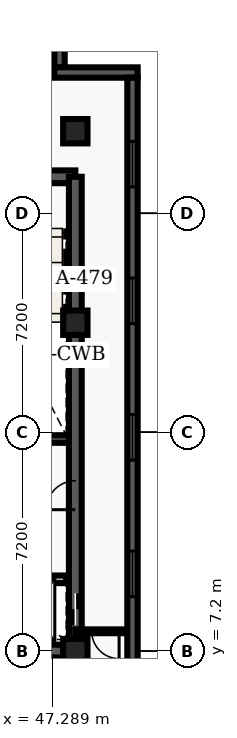
"""IFC4 building model, lengths in metres.
Left out: names, types, materials, properties, quantities, classifications, styles, units other than length and angle.
Written with IfcOpenShell. Run it as: python <this file> out.ifc"""

import sys

from ifc_helpers import new_model, entity, si_unit, converted_unit, direction, frame, origin_with_axes, origin_2d_with_axis, place, context, subcontext, project, spatial, polyline, rectangle, outline, extrude, element, fill, save


model = new_model("IFC4")
c1 = context("Model", 3, precision=1e-05, world=origin_with_axes(), true_north=direction((0.0, 1.0)))
c2 = subcontext(c1, "Body", "Model", "MODEL_VIEW")
j1 = project(units=[si_unit("LENGTHUNIT", "METRE"), converted_unit("PLANEANGLEUNIT", "DEGREE", entity("IfcPlaneAngleMeasure", 0.017), si_unit("PLANEANGLEUNIT", "RADIAN"), dimensions=[0, 0, 0, 0, 0, 0, 0])], contexts=[c1])
p1 = place(None, origin_with_axes())
s1 = spatial("IfcSite", under=j1, at=p1, CompositionType="ELEMENT")
p2 = place(p1, origin_with_axes())
s2 = spatial("IfcBuilding", under=s1, at=p2, CompositionType="ELEMENT")
p3 = place(p2, frame((0.0, 0.0, 280.2), z_axis=(0.0, 0.0, 1.0), x_axis=(1.0, 0.0, 0.0)))
s3 = spatial("IfcBuildingStorey", under=s2, at=p3, CompositionType="ELEMENT", Elevation=280.2)
p4 = place(p3, frame((40.2, 7.2, 0.0), z_axis=(0.0, 0.0, 1.0), x_axis=(1.0, 0.0, 0.0)))
e1 = element("IfcWall", 1, at=p4, inside=s3, PredefinedType="SHEAR", context=c2, shape_type="SweptSolid", body=[
    extrude(outline(polyline([(0.0, -0.21), (7.85, -0.21), (7.85, 0.21), (0.0, 0.21), (0.0, -0.21)])), origin_with_axes(), (0.0, 0.0, 1.0), 3.66),
])
p5 = place(p4, frame((2.175, 0.0, 0.0), z_axis=(0.0, 0.0, 1.0), x_axis=(1.0, 0.0, 0.0)))
e2 = element("IfcOpeningElement", 2, at=p5, cuts=e1, PredefinedType="OPENING", context=c2, shape_type="SweptSolid", body=[
    extrude(rectangle(XDim=1.05, YDim=0.44, at=origin_2d_with_axis()), origin_with_axes(), (0.0, 0.0, 1.0), 2.15),
])
p6 = place(p3, frame((40.2, 22.8, 0.0), z_axis=(0.0, 0.0, 1.0), x_axis=(1.0, 0.0, 0.0)))
e3 = element("IfcWall", 3, at=p6, inside=s3, PredefinedType="SHEAR", context=c2, shape_type="SweptSolid", body=[
    extrude(outline(polyline([(0.0, -0.21), (7.85, -0.21), (7.85, 0.21), (0.0, 0.21), (0.0, -0.21)])), origin_with_axes(), (0.0, 0.0, 1.0), 3.66),
])
p7 = place(p6, frame((5.775, 0.0, 0.0), z_axis=(0.0, 0.0, 1.0), x_axis=(1.0, 0.0, 0.0)))
e4 = element("IfcOpeningElement", 4, at=p7, cuts=e3, PredefinedType="OPENING", context=c2, shape_type="SweptSolid", body=[
    extrude(rectangle(XDim=1.05, YDim=0.44, at=origin_2d_with_axis()), origin_with_axes(), (0.0, 0.0, 1.0), 2.15),
])
p8 = place(p6, frame((2.15, 0.0, 0.0), z_axis=(0.0, 0.0, 1.0), x_axis=(1.0, 0.0, 0.0)))
e5 = element("IfcOpeningElement", 5, at=p8, cuts=e3, PredefinedType="OPENING", context=c2, shape_type="SweptSolid", body=[
    extrude(rectangle(XDim=0.9, YDim=0.44, at=origin_2d_with_axis()), origin_with_axes(), (0.0, 0.0, 1.0), 2.15),
])
p9 = place(p3, frame((48.05, 7.2, 0.0), z_axis=(0.0, 0.0, 1.0), x_axis=(0.0, 1.0, 0.0)))
e6 = element("IfcWall", 6, at=p9, inside=s3, PredefinedType="SHEAR", context=c2, shape_type="SweptSolid", body=[
    extrude(outline(polyline([(0.0, -0.21), (15.6, -0.21), (15.6, 0.21), (0.0, 0.21), (0.0, -0.21)])), origin_with_axes(), (0.0, 0.0, 1.0), 3.66),
])
p10 = place(p9, frame((1.375, 0.0, 0.0), z_axis=(0.0, 0.0, 1.0), x_axis=(1.0, 0.0, 0.0)))
e7 = element("IfcOpeningElement", 7, at=p10, cuts=e6, PredefinedType="OPENING", context=c2, shape_type="SweptSolid", body=[
    extrude(rectangle(XDim=1.05, YDim=0.44, at=origin_2d_with_axis()), origin_with_axes(), (0.0, 0.0, 1.0), 2.15),
])
p11 = place(p9, frame((5.125, 0.0, 0.0), z_axis=(0.0, 0.0, 1.0), x_axis=(1.0, 0.0, 0.0)))
e8 = element("IfcOpeningElement", 8, at=p11, cuts=e6, PredefinedType="OPENING", context=c2, shape_type="SweptSolid", body=[
    extrude(rectangle(XDim=0.95, YDim=0.44, at=origin_2d_with_axis()), origin_with_axes(), (0.0, 0.0, 1.0), 2.15),
])
p12 = place(p3, frame((44.25, 14.175, 0.0), z_axis=(0.0, 0.0, 1.0), x_axis=(1.0, 0.0, 0.0)))
e9 = element("IfcWall", 9, at=p12, inside=s3, PredefinedType="SHEAR", context=c2, shape_type="SweptSolid", body=[
    extrude(outline(polyline([(0.0, -0.125), (3.59, -0.125), (3.59, 0.125), (0.0, 0.125), (0.0, -0.125)])), origin_with_axes(), (0.0, 0.0, 1.0), 3.66),
])
for number, where, z_axis, x_axis in (
    (10, (48.05, 7.2, 0.0), (0.0, 0.0, 1.0), (1.0, 0.0, 0.0)),
    (11, (48.05, 18.0, 0.0), (0.0, 0.0, 1.0), (1.0, 0.0, 0.0)),
    (12, (48.05, 24.3, 0.0), (0.0, 0.0, 1.0), (1.0, 0.0, 0.0)),
):
    element("IfcColumn", number, at=place(p3, frame(where, z_axis=z_axis, x_axis=x_axis)), inside=s3, PredefinedType="COLUMN", context=c2, shape_type="SweptSolid", body=[
        extrude(rectangle(XDim=0.8, YDim=0.8, at=origin_2d_with_axis()), origin_with_axes(), (0.0, 0.0, 1.0), 3.9),
    ])
p13 = place(p3, frame((44.25, 9.56, 0.0), z_axis=(0.0, 0.0, 1.0), x_axis=(1.0, 0.0, 0.0)))
e13 = element("IfcWall", 13, at=p13, inside=s3, PredefinedType="SOLIDWALL", context=c2, shape_type="SweptSolid", body=[
    extrude(outline(polyline([(0.0, -0.125), (3.5, -0.125), (3.5, 0.125), (0.0, 0.125), (0.0, -0.125)])), origin_with_axes(), (0.0, 0.0, 1.0), 2.7),
])
p14 = place(p3, frame((49.765, 7.85, 0.0), z_axis=(0.0, 0.0, 1.0), x_axis=(-1.0, 0.0, 0.0)))
e14 = element("IfcWall", 14, at=p14, inside=s3, PredefinedType="PARTITIONING", context=c2, shape_type="SweptSolid", body=[
    extrude(outline(polyline([(0.0, -0.062), (1.715, -0.062), (1.715, 0.062), (0.0, 0.062), (0.0, -0.062)])), origin_with_axes(), (0.0, 0.0, 1.0), 2.7),
])
p15 = place(p14, frame((0.725, 0.0, 0.0), z_axis=(0.0, 0.0, 1.0), x_axis=(1.0, 0.0, 0.0)))
e15 = element("IfcOpeningElement", 15, at=p15, cuts=e14, PredefinedType="OPENING", context=c2, shape_type="SweptSolid", body=[
    extrude(rectangle(XDim=0.9, YDim=0.145, at=origin_2d_with_axis()), origin_with_axes(), (0.0, 0.0, 1.0), 2.15),
])
p16 = place(p3, frame((34.535, 26.65, 0.0), z_axis=(0.0, 0.0, 1.0), x_axis=(1.0, 0.0, 0.0)))
e16 = element("IfcWall", 16, at=p16, inside=s3, PredefinedType="PARTITIONING", context=c2, shape_type="SweptSolid", body=[
    extrude(outline(polyline([(0.0, -0.062), (12.995, -0.062), (12.995, 0.062), (0.0, 0.062), (0.0, -0.062)])), origin_with_axes(), (0.0, 0.0, 1.0), 2.7),
])
p17 = place(p16, frame((8.465, 0.0, 0.0), z_axis=(0.0, 0.0, 1.0), x_axis=(1.0, 0.0, 0.0)))
e17 = element("IfcOpeningElement", 17, at=p17, cuts=e16, PredefinedType="OPENING", context=c2, shape_type="SweptSolid", body=[
    extrude(rectangle(XDim=1.0, YDim=0.145, at=origin_2d_with_axis()), origin_with_axes(), (0.0, 0.0, 1.0), 2.15),
])
p18 = place(p3, frame((47.53, 28.46, 0.0), z_axis=(0.0, 0.0, 1.0), x_axis=(0.0, -1.0, 0.0)))
e18 = element("IfcWall", 18, at=p18, inside=s3, PredefinedType="SOLIDWALL", context=c2, shape_type="SweptSolid", body=[
    extrude(outline(polyline([(0.0, -0.17), (2.06, -0.17), (2.06, 0.17), (0.0, 0.17), (0.0, -0.17)])), origin_with_axes(), (0.0, 0.0, 1.0), 3.66),
])
p19 = place(p3, frame((47.36, 26.23, 0.0), z_axis=(0.0, 0.0, 1.0), x_axis=(1.0, 0.0, 0.0)))
e19 = element("IfcWall", 19, at=p19, inside=s3, PredefinedType="SOLIDWALL", context=c2, shape_type="SweptSolid", body=[
    extrude(outline(polyline([(0.0, -0.17), (2.74, -0.17), (2.74, 0.17), (0.0, 0.17), (0.0, -0.17)])), origin_with_axes(), (0.0, 0.0, 1.0), 3.66),
])
p20 = place(p3, frame((49.93, 26.06, 0.0), z_axis=(0.0, 0.0, 1.0), x_axis=(0.0, -1.0, 0.0)))
e20 = element("IfcWall", 20, at=p20, inside=s3, PredefinedType="SOLIDWALL", context=c2, shape_type="SweptSolid", body=[
    extrude(outline(polyline([(0.0, -0.17), (23.66, -0.17), (23.66, 0.17), (0.0, 0.17), (0.0, -0.17)])), origin_with_axes(), (0.0, 0.0, 1.0), 3.66),
])
p21 = place(p20, frame((2.846, 0.0, 0.45), z_axis=(0.0, 0.0, 1.0), x_axis=(1.0, 0.0, 0.0)))
e21 = element("IfcOpeningElement", 21, at=p21, cuts=e20, PredefinedType="OPENING", context=c2, shape_type="SweptSolid", body=[
    extrude(rectangle(XDim=1.5, YDim=0.36, at=origin_2d_with_axis()), origin_with_axes(), (0.0, 0.0, 1.0), 2.1),
])
p22 = place(p20, frame((7.338, 0.0, 0.45), z_axis=(0.0, 0.0, 1.0), x_axis=(1.0, 0.0, 0.0)))
e22 = element("IfcOpeningElement", 22, at=p22, cuts=e20, PredefinedType="OPENING", context=c2, shape_type="SweptSolid", body=[
    extrude(rectangle(XDim=1.5, YDim=0.36, at=origin_2d_with_axis()), origin_with_axes(), (0.0, 0.0, 1.0), 2.1),
])
p23 = place(p20, frame((11.83, 0.0, 0.45), z_axis=(0.0, 0.0, 1.0), x_axis=(1.0, 0.0, 0.0)))
e23 = element("IfcOpeningElement", 23, at=p23, cuts=e20, PredefinedType="OPENING", context=c2, shape_type="SweptSolid", body=[
    extrude(rectangle(XDim=1.5, YDim=0.36, at=origin_2d_with_axis()), origin_with_axes(), (0.0, 0.0, 1.0), 2.1),
])
p24 = place(p20, frame((16.322, 0.0, 0.45), z_axis=(0.0, 0.0, 1.0), x_axis=(1.0, 0.0, 0.0)))
e24 = element("IfcOpeningElement", 24, at=p24, cuts=e20, PredefinedType="OPENING", context=c2, shape_type="SweptSolid", body=[
    extrude(rectangle(XDim=1.5, YDim=0.36, at=origin_2d_with_axis()), origin_with_axes(), (0.0, 0.0, 1.0), 2.1),
])
p25 = place(p20, frame((20.814, 0.0, 0.45), z_axis=(0.0, 0.0, 1.0), x_axis=(1.0, 0.0, 0.0)))
e25 = element("IfcOpeningElement", 25, at=p25, cuts=e20, PredefinedType="OPENING", context=c2, shape_type="SweptSolid", body=[
    extrude(rectangle(XDim=1.5, YDim=0.36, at=origin_2d_with_axis()), origin_with_axes(), (0.0, 0.0, 1.0), 2.1),
])
p26 = place(p9, frame((1.375, 0.0, 0.0), z_axis=(0.0, 0.0, 1.0), x_axis=(1.0, 0.0, 0.0)))
e26 = element("IfcDoor", 26, at=p26, inside=s3, OperationType="SLIDING_TO_LEFT", PredefinedType="DOOR", context=c2, shape_type="SweptSolid", body=[
    extrude(rectangle(XDim=1.05, YDim=0.09, at=origin_2d_with_axis()), origin_with_axes(), (0.0, 0.0, 1.0), 2.15),
])
fill(e7, e26)
p27 = place(p9, frame((5.125, 0.0, 0.0), z_axis=(0.0, 0.0, 1.0), x_axis=(1.0, 0.0, 0.0)))
e27 = element("IfcDoor", 27, at=p27, inside=s3, OperationType="SINGLE_SWING_LEFT", PredefinedType="DOOR", context=c2, shape_type="SweptSolid", body=[
    extrude(rectangle(XDim=0.95, YDim=0.09, at=origin_2d_with_axis()), origin_with_axes(), (0.0, 0.0, 1.0), 2.15),
])
fill(e8, e27)
p28 = place(p14, frame((0.725, 0.0, 0.0), z_axis=(0.0, 0.0, 1.0), x_axis=(1.0, 0.0, 0.0)))
e28 = element("IfcDoor", 28, at=p28, inside=s3, OperationType="SINGLE_SWING_LEFT", PredefinedType="DOOR", context=c2, shape_type="SweptSolid", body=[
    extrude(rectangle(XDim=0.9, YDim=0.075, at=origin_2d_with_axis()), origin_with_axes(), (0.0, 0.0, 1.0), 2.15),
])
fill(e15, e28)
p29 = place(p20, frame((2.846, 0.0, 0.45), z_axis=(0.0, 0.0, 1.0), x_axis=(1.0, 0.0, 0.0)))
e29 = element("IfcWindow", 29, at=p29, inside=s3, PredefinedType="WINDOW", context=c2, shape_type="SweptSolid", body=[
    extrude(rectangle(XDim=1.5, YDim=0.09, at=origin_2d_with_axis()), origin_with_axes(), (0.0, 0.0, 1.0), 2.1),
])
fill(e21, e29)
p30 = place(p20, frame((7.338, 0.0, 0.45), z_axis=(0.0, 0.0, 1.0), x_axis=(1.0, 0.0, 0.0)))
e30 = element("IfcWindow", 30, at=p30, inside=s3, PredefinedType="WINDOW", context=c2, shape_type="SweptSolid", body=[
    extrude(rectangle(XDim=1.5, YDim=0.09, at=origin_2d_with_axis()), origin_with_axes(), (0.0, 0.0, 1.0), 2.1),
])
fill(e22, e30)
p31 = place(p20, frame((11.83, 0.0, 0.45), z_axis=(0.0, 0.0, 1.0), x_axis=(1.0, 0.0, 0.0)))
e31 = element("IfcWindow", 31, at=p31, inside=s3, PredefinedType="WINDOW", context=c2, shape_type="SweptSolid", body=[
    extrude(rectangle(XDim=1.5, YDim=0.09, at=origin_2d_with_axis()), origin_with_axes(), (0.0, 0.0, 1.0), 2.1),
])
fill(e23, e31)
p32 = place(p20, frame((16.322, 0.0, 0.45), z_axis=(0.0, 0.0, 1.0), x_axis=(1.0, 0.0, 0.0)))
e32 = element("IfcWindow", 32, at=p32, inside=s3, PredefinedType="WINDOW", context=c2, shape_type="SweptSolid", body=[
    extrude(rectangle(XDim=1.5, YDim=0.09, at=origin_2d_with_axis()), origin_with_axes(), (0.0, 0.0, 1.0), 2.1),
])
fill(e24, e32)
save(model, sys.argv[1])
